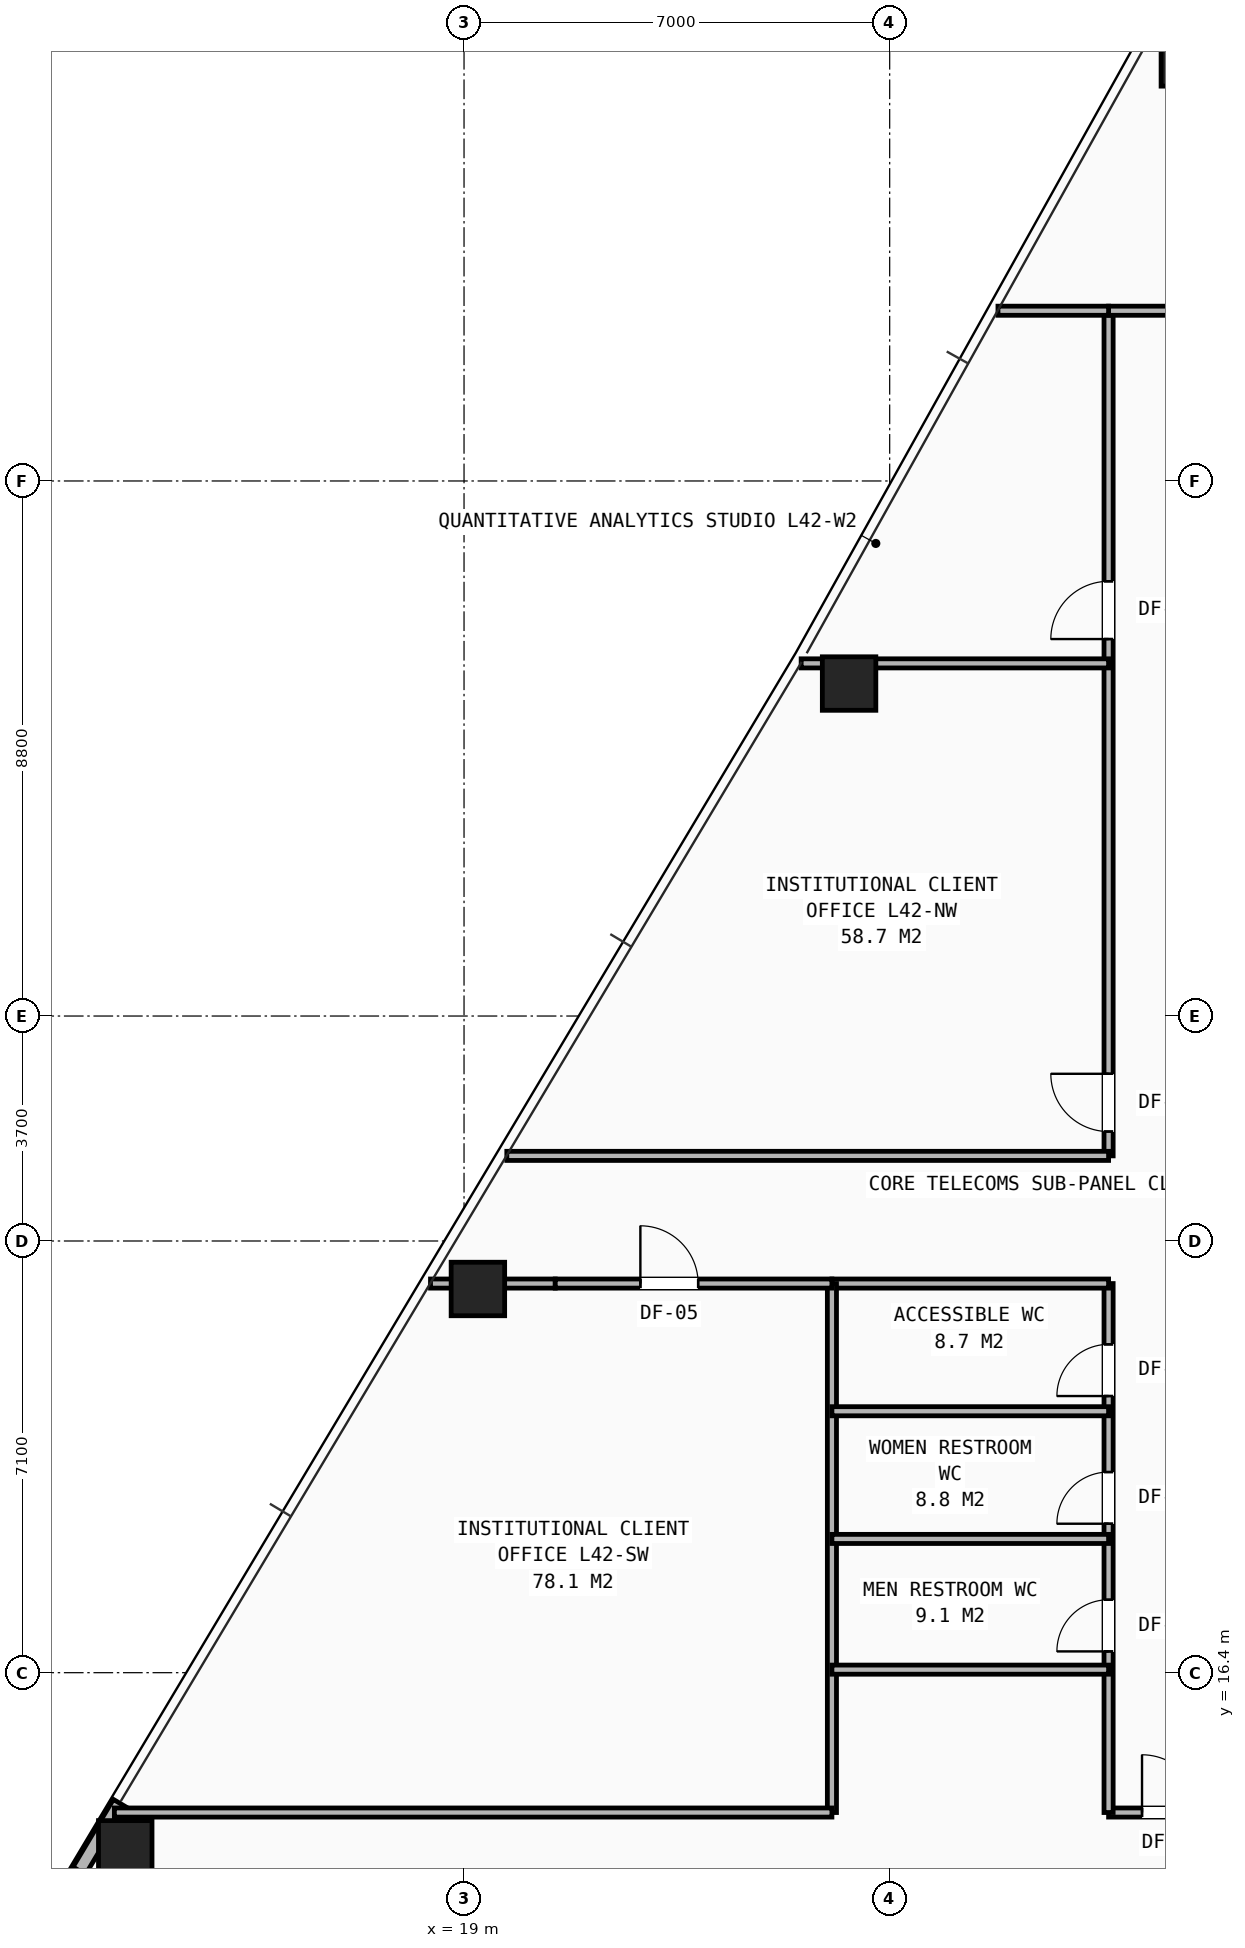
"""IFC4 building model, lengths in metres.
Left out: names, types, materials, properties, quantities, classifications, styles, units other than length and angle.
Written with IfcOpenShell. Run it as: python <this file> out.ifc"""

import sys

from ifc_helpers import new_model, si_unit, direction, frame, frame_2d, origin, origin_2d, place, context, subcontext, project, spatial, rectangle, hollow_rectangle, extrude, element, fill, save


model = new_model("IFC4")
c1 = context("Model", 3, precision=1e-05, world=origin(), true_north=direction((0.0, 1.0)))
c2 = subcontext(c1, "Body", "Model", "MODEL_VIEW")
j1 = project(units=[si_unit("LENGTHUNIT", "METRE"), si_unit("PLANEANGLEUNIT", "RADIAN")], contexts=[c1])
p1 = place(None, origin())
s1 = spatial("IfcSite", under=j1, at=p1, CompositionType="ELEMENT")
p2 = place(p1, origin())
s2 = spatial("IfcBuilding", under=s1, at=p2, CompositionType="ELEMENT")
p3 = place(p2, frame((0.0, 0.0, 147.05)))
s3 = spatial("IfcBuildingStorey", under=s2, at=p3, CompositionType="ELEMENT", Elevation=147.05)
for number, where, z_axis, x_axis in (
    (1, (30.904, 42.934, 0.0), (0.0, 0.0, 1.0), (1.0, 0.0, 0.0)),
    (2, (25.333, 32.668, 0.0), (0.0, 0.0, 1.0), (1.0, 0.0, 0.0)),
    (3, (19.228, 22.711, 0.0), (0.0, 0.0, 1.0), (1.0, 0.0, 0.0)),
    (4, (13.428, 13.527, 0.0), (0.0, 0.0, 1.0), (1.0, 0.0, 0.0)),
):
    element("IfcColumn", number, at=place(p3, frame(where, z_axis=z_axis, x_axis=x_axis)), inside=s3, PredefinedType="COLUMN", context=c2, shape_type="SweptSolid", body=[
        extrude(hollow_rectangle(XDim=0.88, YDim=0.88, WallThickness=0.06, at=origin_2d()), origin(), (0.0, 0.0, 1.0), 3.45),
    ])
p4 = place(p3, frame((13.336, 14.254, 0.0), z_axis=(0.0, 0.0, 1.0), x_axis=(-0.513024934393, -0.858373704567, 0.0)))
e5 = element("IfcWall", 5, at=p4, inside=s3, PredefinedType="SHEAR", context=c2, shape_type="SweptSolid", body=[
    extrude(rectangle(XDim=1.294, YDim=0.24, at=frame_2d((0.647, 0.0))), origin(), (0.0, 0.0, 1.0), 2.583),
])
p5 = place(p3, frame((29.6, 14.1, 0.0), z_axis=(0.0, 0.0, 1.0), x_axis=(1.0, 0.0, 0.0)))
e6 = element("IfcWall", 6, at=p5, inside=s3, PredefinedType="PARTITIONING", context=c2, shape_type="SweptSolid", body=[
    extrude(rectangle(XDim=18.6, YDim=0.15, at=frame_2d((9.3, 0.0))), origin(), (0.0, 0.0, 1.0), 2.225),
])
p6 = place(p5, frame((0.55, 0.0, 0.0)))
e7 = element("IfcOpeningElement", 7, at=p6, cuts=e6, PredefinedType="OPENING", context=c2, shape_type="SweptSolid", body=[
    extrude(rectangle(XDim=0.95, YDim=2.1, at=frame_2d((0.475, 1.05))), frame((0.0, 0.085, 0.0), z_axis=(0.0, -1.0, 0.0), x_axis=(1.0, 0.0, 0.0)), (0.0, 0.0, 1.0), 0.17),
])
p7 = place(p3, frame((29.6, 14.1, 0.0), z_axis=(0.0, 0.0, 1.0), x_axis=(0.0, 1.0, 0.0)))
e8 = element("IfcWall", 8, at=p7, inside=s3, PredefinedType="PARTITIONING", context=c2, shape_type="SweptSolid", body=[
    extrude(rectangle(XDim=8.7, YDim=0.15, at=frame_2d((4.35, 0.0))), origin(), (0.0, 0.0, 1.0), 3.21),
])
p8 = place(p7, frame((2.65, 0.0, 0.0)))
e9 = element("IfcOpeningElement", 9, at=p8, cuts=e8, PredefinedType="OPENING", context=c2, shape_type="SweptSolid", body=[
    extrude(rectangle(XDim=0.85, YDim=2.05, at=frame_2d((0.425, 1.025))), frame((0.0, 0.085, 0.0), z_axis=(0.0, -1.0, 0.0), x_axis=(1.0, 0.0, 0.0)), (0.0, 0.0, 1.0), 0.17),
])
p9 = place(p7, frame((4.75, 0.0, 0.0)))
e10 = element("IfcOpeningElement", 10, at=p9, cuts=e8, PredefinedType="OPENING", context=c2, shape_type="SweptSolid", body=[
    extrude(rectangle(XDim=0.85, YDim=2.05, at=frame_2d((0.425, 1.025))), frame((0.0, 0.085, 0.0), z_axis=(0.0, -1.0, 0.0), x_axis=(1.0, 0.0, 0.0)), (0.0, 0.0, 1.0), 0.17),
])
p10 = place(p7, frame((6.85, 0.0, 0.0)))
e11 = element("IfcOpeningElement", 11, at=p10, cuts=e8, PredefinedType="OPENING", context=c2, shape_type="SweptSolid", body=[
    extrude(rectangle(XDim=0.85, YDim=2.05, at=frame_2d((0.425, 1.025))), frame((0.0, 0.085, 0.0), z_axis=(0.0, -1.0, 0.0), x_axis=(1.0, 0.0, 0.0)), (0.0, 0.0, 1.0), 0.17),
])
p11 = place(p3, frame((29.6, 24.9, 0.0), z_axis=(0.0, 0.0, 1.0), x_axis=(0.0, 1.0, 0.0)))
e12 = element("IfcWall", 12, at=p11, inside=s3, PredefinedType="PARTITIONING", context=c2, shape_type="SweptSolid", body=[
    extrude(rectangle(XDim=13.9, YDim=0.15, at=frame_2d((6.95, 0.0))), origin(), (0.0, 0.0, 1.0), 2.225),
])
p12 = place(p11, frame((0.4, 0.0, 0.0)))
e13 = element("IfcOpeningElement", 13, at=p12, cuts=e12, PredefinedType="OPENING", context=c2, shape_type="SweptSolid", body=[
    extrude(rectangle(XDim=0.95, YDim=2.1, at=frame_2d((0.475, 1.05))), frame((0.0, 0.085, 0.0), z_axis=(0.0, -1.0, 0.0), x_axis=(1.0, 0.0, 0.0)), (0.0, 0.0, 1.0), 0.17),
])
p13 = place(p11, frame((8.5, 0.0, 0.0)))
e14 = element("IfcOpeningElement", 14, at=p13, cuts=e12, PredefinedType="OPENING", context=c2, shape_type="SweptSolid", body=[
    extrude(rectangle(XDim=0.95, YDim=2.1, at=frame_2d((0.475, 1.05))), frame((0.0, 0.085, 0.0), z_axis=(0.0, -1.0, 0.0), x_axis=(1.0, 0.0, 0.0)), (0.0, 0.0, 1.0), 0.17),
])
p14 = place(p3, frame((29.6, 38.8, 0.0), z_axis=(0.0, 0.0, 1.0), x_axis=(1.0, 0.0, 0.0)))
e15 = element("IfcWall", 15, at=p14, inside=s3, PredefinedType="PARTITIONING", context=c2, shape_type="SweptSolid", body=[
    extrude(rectangle(XDim=2.2, YDim=0.15, at=frame_2d((1.1, 0.0))), origin(), (0.0, 0.0, 1.0), 2.743),
])
p15 = place(p3, frame((18.448, 22.8, 0.0), z_axis=(0.0, 0.0, 1.0), x_axis=(1.0, 0.0, 0.0)))
e16 = element("IfcWall", 16, at=p15, inside=s3, PredefinedType="PARTITIONING", context=c2, shape_type="SweptSolid", body=[
    extrude(rectangle(XDim=2.052, YDim=0.15, at=frame_2d((1.026, 0.0))), origin(), (0.0, 0.0, 1.0), 2.589),
])
p16 = place(p3, frame((25.05, 22.8, 0.0), z_axis=(0.0, 0.0, 1.0), x_axis=(1.0, 0.0, 0.0)))
e17 = element("IfcWall", 17, at=p16, inside=s3, PredefinedType="PARTITIONING", context=c2, shape_type="SweptSolid", body=[
    extrude(rectangle(XDim=4.55, YDim=0.15, at=frame_2d((2.275, 0.0))), origin(), (0.0, 0.0, 1.0), 3.21),
])
p17 = place(p3, frame((19.703, 24.9, 0.0), z_axis=(0.0, 0.0, 1.0), x_axis=(1.0, 0.0, 0.0)))
e18 = element("IfcWall", 18, at=p17, inside=s3, PredefinedType="PARTITIONING", context=c2, shape_type="SweptSolid", body=[
    extrude(rectangle(XDim=9.897, YDim=0.15, at=frame_2d((4.948, 0.0))), origin(), (0.0, 0.0, 1.0), 2.589),
])
p18 = place(p3, frame((25.05, 14.1, 0.0), z_axis=(0.0, 0.0, 1.0), x_axis=(0.0, 1.0, 0.0)))
e19 = element("IfcWall", 19, at=p18, inside=s3, PredefinedType="PARTITIONING", context=c2, shape_type="SweptSolid", body=[
    extrude(rectangle(XDim=8.7, YDim=0.15, at=frame_2d((4.35, 0.0))), origin(), (0.0, 0.0, 1.0), 3.21),
])
for number, where, z_axis, x_axis in (
    (20, (25.05, 16.45, 0.0), (0.0, 0.0, 1.0), (1.0, 0.0, 0.0)),
    (21, (25.05, 18.6, 0.0), (0.0, 0.0, 1.0), (1.0, 0.0, 0.0)),
    (22, (25.05, 20.7, 0.0), (0.0, 0.0, 1.0), (1.0, 0.0, 0.0)),
):
    element("IfcWall", number, at=place(p3, frame(where, z_axis=z_axis, x_axis=x_axis)), inside=s3, PredefinedType="PARTITIONING", context=c2, shape_type="SweptSolid", body=[
        extrude(rectangle(XDim=4.55, YDim=0.15, at=frame_2d((2.275, 0.0))), origin(), (0.0, 0.0, 1.0), 3.21),
    ])
p19 = place(p3, frame((13.249, 14.1, 0.0), z_axis=(0.0, 0.0, 1.0), x_axis=(1.0, 0.0, 0.0)))
e23 = element("IfcWall", 23, at=p19, inside=s3, PredefinedType="PARTITIONING", context=c2, shape_type="SweptSolid", body=[
    extrude(rectangle(XDim=11.801, YDim=0.15, at=frame_2d((5.9, 0.0))), origin(), (0.0, 0.0, 1.0), 2.589),
])
p20 = place(p3, frame((20.5, 22.8, 0.0), z_axis=(0.0, 0.0, 1.0), x_axis=(1.0, 0.0, 0.0)))
e24 = element("IfcWall", 24, at=p20, inside=s3, PredefinedType="PARTITIONING", context=c2, shape_type="SweptSolid", body=[
    extrude(rectangle(XDim=4.55, YDim=0.15, at=frame_2d((2.275, 0.0))), origin(), (0.0, 0.0, 1.0), 3.21),
])
p21 = place(p20, frame((1.4, 0.0, 0.0)))
e25 = element("IfcOpeningElement", 25, at=p21, cuts=e24, PredefinedType="OPENING", context=c2, shape_type="SweptSolid", body=[
    extrude(rectangle(XDim=0.95, YDim=2.1, at=frame_2d((0.475, 1.05))), frame((0.0, 0.085, 0.0), z_axis=(0.0, -1.0, 0.0), x_axis=(1.0, 0.0, 0.0)), (0.0, 0.0, 1.0), 0.17),
])
p22 = place(p3, frame((27.781, 38.8, 0.0), z_axis=(0.0, 0.0, 1.0), x_axis=(1.0, 0.0, 0.0)))
e26 = element("IfcWall", 26, at=p22, inside=s3, PredefinedType="PARTITIONING", context=c2, shape_type="SweptSolid", body=[
    extrude(rectangle(XDim=1.819, YDim=0.15, at=frame_2d((0.91, 0.0))), origin(), (0.0, 0.0, 1.0), 2.589),
])
p23 = place(p3, frame((24.544, 33.0, 0.0), z_axis=(0.0, 0.0, 1.0), x_axis=(1.0, 0.0, 0.0)))
e27 = element("IfcWall", 27, at=p23, inside=s3, PredefinedType="PARTITIONING", context=c2, shape_type="SweptSolid", body=[
    extrude(rectangle(XDim=5.056, YDim=0.15, at=frame_2d((2.528, 0.0))), origin(), (0.0, 0.0, 1.0), 2.225),
])
p24 = place(p8, origin())
e28 = element("IfcDoor", 28, at=p24, inside=s3, OperationType="SINGLE_SWING_LEFT", PredefinedType="DOOR", context=c2, shape_type="SweptSolid", body=[
    extrude(rectangle(XDim=0.85, YDim=2.05, at=frame_2d((0.425, 1.025))), frame((0.0, 0.025, 0.0), z_axis=(0.0, -1.0, 0.0), x_axis=(1.0, 0.0, 0.0)), (0.0, 0.0, 1.0), 0.05),
])
fill(e9, e28)
p25 = place(p9, origin())
e29 = element("IfcDoor", 29, at=p25, inside=s3, OperationType="SINGLE_SWING_LEFT", PredefinedType="DOOR", context=c2, shape_type="SweptSolid", body=[
    extrude(rectangle(XDim=0.85, YDim=2.05, at=frame_2d((0.425, 1.025))), frame((0.0, 0.025, 0.0), z_axis=(0.0, -1.0, 0.0), x_axis=(1.0, 0.0, 0.0)), (0.0, 0.0, 1.0), 0.05),
])
fill(e10, e29)
p26 = place(p10, origin())
e30 = element("IfcDoor", 30, at=p26, inside=s3, OperationType="SINGLE_SWING_LEFT", PredefinedType="DOOR", context=c2, shape_type="SweptSolid", body=[
    extrude(rectangle(XDim=0.85, YDim=2.05, at=frame_2d((0.425, 1.025))), frame((0.0, 0.025, 0.0), z_axis=(0.0, -1.0, 0.0), x_axis=(1.0, 0.0, 0.0)), (0.0, 0.0, 1.0), 0.05),
])
fill(e11, e30)
p27 = place(p6, origin())
e31 = element("IfcDoor", 31, at=p27, inside=s3, OperationType="SINGLE_SWING_LEFT", PredefinedType="DOOR", context=c2, shape_type="SweptSolid", body=[
    extrude(rectangle(XDim=0.95, YDim=2.1, at=frame_2d((0.475, 1.05))), frame((0.0, 0.025, 0.0), z_axis=(0.0, -1.0, 0.0), x_axis=(1.0, 0.0, 0.0)), (0.0, 0.0, 1.0), 0.05),
])
fill(e7, e31)
p28 = place(p21, origin())
e32 = element("IfcDoor", 32, at=p28, inside=s3, OperationType="SINGLE_SWING_LEFT", PredefinedType="DOOR", context=c2, shape_type="SweptSolid", body=[
    extrude(rectangle(XDim=0.95, YDim=2.1, at=frame_2d((0.475, 1.05))), frame((0.0, 0.025, 0.0), z_axis=(0.0, -1.0, 0.0), x_axis=(1.0, 0.0, 0.0)), (0.0, 0.0, 1.0), 0.05),
])
fill(e25, e32)
p29 = place(p12, origin())
e33 = element("IfcDoor", 33, at=p29, inside=s3, OperationType="SINGLE_SWING_RIGHT", PredefinedType="DOOR", context=c2, shape_type="SweptSolid", body=[
    extrude(rectangle(XDim=0.95, YDim=2.1, at=frame_2d((0.475, 1.05))), frame((0.0, 0.025, 0.0), z_axis=(0.0, -1.0, 0.0), x_axis=(1.0, 0.0, 0.0)), (0.0, 0.0, 1.0), 0.05),
])
fill(e13, e33)
p30 = place(p13, origin())
e34 = element("IfcDoor", 34, at=p30, inside=s3, OperationType="SINGLE_SWING_LEFT", PredefinedType="DOOR", context=c2, shape_type="SweptSolid", body=[
    extrude(rectangle(XDim=0.95, YDim=2.1, at=frame_2d((0.475, 1.05))), frame((0.0, 0.025, 0.0), z_axis=(0.0, -1.0, 0.0), x_axis=(1.0, 0.0, 0.0)), (0.0, 0.0, 1.0), 0.05),
])
fill(e14, e34)
save(model, sys.argv[1])
